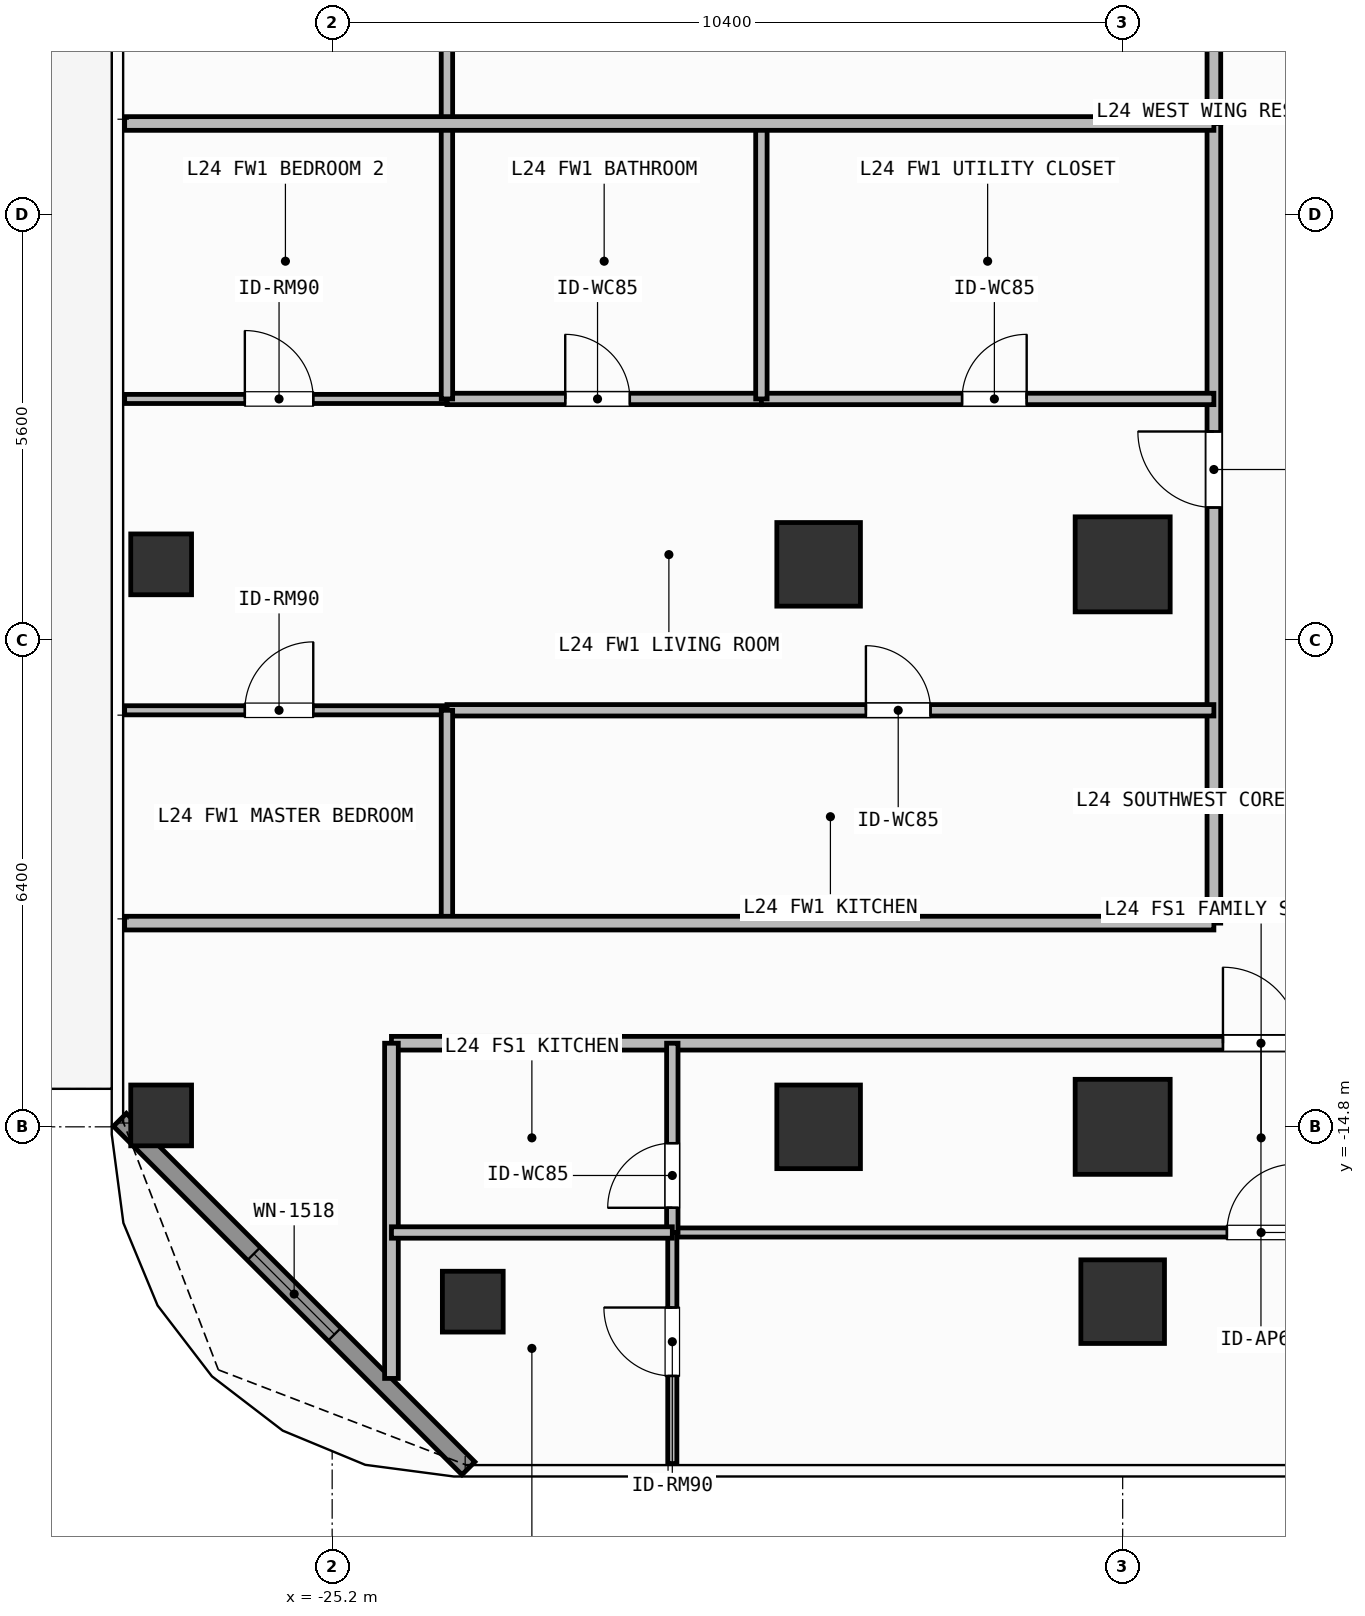
"""IFC4 building model, lengths in metres.
Left out: names, types, materials, properties, quantities, classifications, styles, units other than length and angle.
Written with IfcOpenShell. Run it as: python <this file> out.ifc"""

import sys

from ifc_helpers import new_model, si_unit, direction, frame, frame_2d, origin, origin_2d, place, context, subcontext, project, spatial, rectangle, hollow_rectangle, extrude, element, fill, save


model = new_model("IFC4")
c1 = context("Model", 3, precision=1e-05, world=origin(), true_north=direction((0.0, 1.0)))
c2 = subcontext(c1, "Body", "Model", "MODEL_VIEW")
j1 = project(units=[si_unit("LENGTHUNIT", "METRE"), si_unit("PLANEANGLEUNIT", "RADIAN")], contexts=[c1])
p1 = place(None, origin())
s1 = spatial("IfcSite", under=j1, at=p1, CompositionType="ELEMENT")
p2 = place(p1, origin())
s2 = spatial("IfcBuilding", under=s1, at=p2, CompositionType="ELEMENT")
p3 = place(p2, frame((0.0, 0.0, 96.9)))
s3 = spatial("IfcBuildingStorey", under=s2, at=p3, CompositionType="ELEMENT", Elevation=96.9)
for number, where, z_axis, x_axis in (
    (1, (-14.8, -14.8, 0.0), (0.0, 0.0, 1.0), (1.0, 0.0, 0.0)),
    (2, (-14.8, -7.4, 0.0), (0.0, 0.0, 1.0), (1.0, 0.0, 0.0)),
):
    element("IfcColumn", number, at=place(p3, frame(where, z_axis=z_axis, x_axis=x_axis)), inside=s3, PredefinedType="COLUMN", context=c2, shape_type="SweptSolid", body=[
        extrude(rectangle(XDim=1.25, YDim=1.25, at=origin_2d()), origin(), (0.0, 0.0, 1.0), 3.9),
    ])
for number, where, z_axis, x_axis in (
    (3, (-18.8, -14.8, 0.0), (0.0, 0.0, 1.0), (1.0, 0.0, 0.0)),
    (4, (-18.8, -7.4, 0.0), (0.0, 0.0, 1.0), (1.0, 0.0, 0.0)),
    (5, (-14.8, -17.1, 0.0), (0.0, 0.0, 1.0), (1.0, 0.0, 0.0)),
):
    element("IfcColumn", number, at=place(p3, frame(where, z_axis=z_axis, x_axis=x_axis)), inside=s3, PredefinedType="COLUMN", context=c2, shape_type="SweptSolid", body=[
        extrude(rectangle(XDim=1.1, YDim=1.1, at=origin_2d()), origin(), (0.0, 0.0, 1.0), 3.9),
    ])
for number, where, z_axis, x_axis in (
    (6, (-23.35, -17.1, 0.0), (0.0, 0.0, 1.0), (1.0, 0.0, 0.0)),
    (7, (-27.45, -14.65, 0.0), (0.0, 0.0, 1.0), (1.0, 0.0, 0.0)),
    (8, (-27.45, -7.4, 0.0), (0.0, 0.0, 1.0), (1.0, 0.0, 0.0)),
):
    element("IfcColumn", number, at=place(p3, frame(where, z_axis=z_axis, x_axis=x_axis)), inside=s3, PredefinedType="COLUMN", context=c2, shape_type="SweptSolid", body=[
        extrude(hollow_rectangle(XDim=0.8, YDim=0.8, WallThickness=0.036, at=origin_2d()), origin(), (0.0, 0.0, 1.0), 3.9),
    ])
p4 = place(p3, frame((-23.408, -19.292, 0.0), z_axis=(0.0, 0.0, 1.0), x_axis=(-0.707087954376, 0.707125607496, 0.0)))
e9 = element("IfcWall", 9, at=p4, inside=s3, PredefinedType="SOLIDWALL", context=c2, shape_type="SweptSolid", body=[
    extrude(rectangle(XDim=6.484, YDim=0.24, at=frame_2d((3.242, 0.0))), origin(), (0.0, 0.0, 1.0), 3.68),
])
p5 = place(p4, frame((2.492, 0.0, 0.8)))
e10 = element("IfcOpeningElement", 10, at=p5, cuts=e9, PredefinedType="OPENING", context=c2, shape_type="SweptSolid", body=[
    extrude(rectangle(XDim=1.5, YDim=1.85, at=frame_2d((0.75, 0.925))), frame((0.0, 0.13, 0.0), z_axis=(0.0, -1.0, 0.0), x_axis=(1.0, 0.0, 0.0)), (0.0, 0.0, 1.0), 0.26),
])
p6 = place(p3, frame((-24.42, -13.7, 0.0), z_axis=(0.0, 0.0, 1.0), x_axis=(1.0, 0.0, 0.0)))
e11 = element("IfcWall", 11, at=p6, inside=s3, PredefinedType="PARTITIONING", context=c2, shape_type="SweptSolid", body=[
    extrude(rectangle(XDim=25.394, YDim=0.18, at=frame_2d((12.697, 0.0))), origin(), (0.0, 0.0, 1.0), 3.68),
])
p7 = place(p6, frame((10.939, 0.0, 0.0)))
e12 = element("IfcOpeningElement", 12, at=p7, cuts=e11, PredefinedType="OPENING", context=c2, shape_type="SweptSolid", body=[
    extrude(rectangle(XDim=1.0, YDim=2.2, at=frame_2d((0.5, 1.1))), frame((0.0, 0.1, 0.0), z_axis=(0.0, -1.0, 0.0), x_axis=(1.0, 0.0, 0.0)), (0.0, 0.0, 1.0), 0.2),
])
p8 = place(p3, frame((-20.725, -16.19, 0.0), z_axis=(0.0, 0.0, 1.0), x_axis=(1.0, 0.0, 0.0)))
e13 = element("IfcWall", 13, at=p8, inside=s3, PredefinedType="PARTITIONING", context=c2, shape_type="SweptSolid", body=[
    extrude(rectangle(XDim=15.493, YDim=0.12, at=frame_2d((7.747, 0.0))), origin(), (0.0, 0.0, 1.0), 3.68),
])
p9 = place(p8, frame((7.296, 0.0, 0.0)))
e14 = element("IfcOpeningElement", 14, at=p9, cuts=e13, PredefinedType="OPENING", context=c2, shape_type="SweptSolid", body=[
    extrude(rectangle(XDim=0.9, YDim=2.1, at=frame_2d((0.45, 1.05))), frame((0.0, 0.07, 0.0), z_axis=(0.0, -1.0, 0.0), x_axis=(1.0, 0.0, 0.0)), (0.0, 0.0, 1.0), 0.14),
])
p10 = place(p3, frame((-20.725, -16.19, 0.0), z_axis=(0.0, 0.0, 1.0), x_axis=(0.0, 1.0, 0.0)))
e15 = element("IfcWall", 15, at=p10, inside=s3, PredefinedType="PARTITIONING", context=c2, shape_type="SweptSolid", body=[
    extrude(rectangle(XDim=2.49, YDim=0.15, at=frame_2d((1.245, 0.0))), origin(), (0.0, 0.0, 1.0), 3.68),
])
p11 = place(p10, frame((0.325, 0.0, 0.0)))
e16 = element("IfcOpeningElement", 16, at=p11, cuts=e15, PredefinedType="OPENING", context=c2, shape_type="SweptSolid", body=[
    extrude(rectangle(XDim=0.85, YDim=2.1, at=frame_2d((0.425, 1.05))), frame((0.0, 0.085, 0.0), z_axis=(0.0, -1.0, 0.0), x_axis=(1.0, 0.0, 0.0)), (0.0, 0.0, 1.0), 0.17),
])
p12 = place(p3, frame((-20.725, -19.23, 0.0), z_axis=(0.0, 0.0, 1.0), x_axis=(0.0, 1.0, 0.0)))
e17 = element("IfcWall", 17, at=p12, inside=s3, PredefinedType="PARTITIONING", context=c2, shape_type="SweptSolid", body=[
    extrude(rectangle(XDim=3.04, YDim=0.12, at=frame_2d((1.52, 0.0))), origin(), (0.0, 0.0, 1.0), 3.68),
])
p13 = place(p12, frame((1.153, 0.0, 0.0)))
e18 = element("IfcOpeningElement", 18, at=p13, cuts=e17, PredefinedType="OPENING", context=c2, shape_type="SweptSolid", body=[
    extrude(rectangle(XDim=0.9, YDim=2.1, at=frame_2d((0.45, 1.05))), frame((0.0, 0.07, 0.0), z_axis=(0.0, -1.0, 0.0), x_axis=(1.0, 0.0, 0.0)), (0.0, 0.0, 1.0), 0.14),
])
p14 = place(p3, frame((-13.6, -12.12, 0.0), z_axis=(0.0, 0.0, 1.0), x_axis=(0.0, 1.0, 0.0)))
e19 = element("IfcWall", 19, at=p14, inside=s3, PredefinedType="PARTITIONING", context=c2, shape_type="SweptSolid", body=[
    extrude(rectangle(XDim=10.52, YDim=0.18, at=frame_2d((5.26, 0.0))), origin(), (0.0, 0.0, 1.0), 3.68),
])
p15 = place(p14, frame((5.468, 0.0, 0.0)))
e20 = element("IfcOpeningElement", 20, at=p15, cuts=e19, PredefinedType="OPENING", context=c2, shape_type="SweptSolid", body=[
    extrude(rectangle(XDim=1.0, YDim=2.2, at=frame_2d((0.5, 1.1))), frame((0.0, 0.1, 0.0), z_axis=(0.0, -1.0, 0.0), x_axis=(1.0, 0.0, 0.0)), (0.0, 0.0, 1.0), 0.2),
])
p16 = place(p3, frame((-23.69, -5.224, 0.0), z_axis=(0.0, 0.0, 1.0), x_axis=(1.0, 0.0, 0.0)))
e21 = element("IfcWall", 21, at=p16, inside=s3, PredefinedType="PARTITIONING", context=c2, shape_type="SweptSolid", body=[
    extrude(rectangle(XDim=4.137, YDim=0.15, at=frame_2d((2.068, 0.0))), origin(), (0.0, 0.0, 1.0), 3.68),
])
p17 = place(p16, frame((1.556, 0.0, 0.0)))
e22 = element("IfcOpeningElement", 22, at=p17, cuts=e21, PredefinedType="OPENING", context=c2, shape_type="SweptSolid", body=[
    extrude(rectangle(XDim=0.85, YDim=2.1, at=frame_2d((0.425, 1.05))), frame((0.0, 0.085, 0.0), z_axis=(0.0, -1.0, 0.0), x_axis=(1.0, 0.0, 0.0)), (0.0, 0.0, 1.0), 0.17),
])
p18 = place(p3, frame((-19.553, -5.224, 0.0), z_axis=(0.0, 0.0, 1.0), x_axis=(1.0, 0.0, 0.0)))
e23 = element("IfcWall", 23, at=p18, inside=s3, PredefinedType="PARTITIONING", context=c2, shape_type="SweptSolid", body=[
    extrude(rectangle(XDim=5.953, YDim=0.15, at=frame_2d((2.977, 0.0))), origin(), (0.0, 0.0, 1.0), 3.68),
])
p19 = place(p18, frame((2.64, 0.0, 0.0)))
e24 = element("IfcOpeningElement", 24, at=p19, cuts=e23, PredefinedType="OPENING", context=c2, shape_type="SweptSolid", body=[
    extrude(rectangle(XDim=0.85, YDim=2.1, at=frame_2d((0.425, 1.05))), frame((0.0, 0.085, 0.0), z_axis=(0.0, -1.0, 0.0), x_axis=(1.0, 0.0, 0.0)), (0.0, 0.0, 1.0), 0.17),
])
p20 = place(p3, frame((-23.69, -9.32, 0.0), z_axis=(0.0, 0.0, 1.0), x_axis=(1.0, 0.0, 0.0)))
e25 = element("IfcWall", 25, at=p20, inside=s3, PredefinedType="PARTITIONING", context=c2, shape_type="SweptSolid", body=[
    extrude(rectangle(XDim=10.09, YDim=0.15, at=frame_2d((5.045, 0.0))), origin(), (0.0, 0.0, 1.0), 3.68),
])
p21 = place(p20, frame((5.512, 0.0, 0.0)))
e26 = element("IfcOpeningElement", 26, at=p21, cuts=e25, PredefinedType="OPENING", context=c2, shape_type="SweptSolid", body=[
    extrude(rectangle(XDim=0.85, YDim=2.1, at=frame_2d((0.425, 1.05))), frame((0.0, 0.085, 0.0), z_axis=(0.0, -1.0, 0.0), x_axis=(1.0, 0.0, 0.0)), (0.0, 0.0, 1.0), 0.17),
])
p22 = place(p3, frame((-27.93, -9.32, 0.0), z_axis=(0.0, 0.0, 1.0), x_axis=(1.0, 0.0, 0.0)))
e27 = element("IfcWall", 27, at=p22, inside=s3, PredefinedType="PARTITIONING", context=c2, shape_type="SweptSolid", body=[
    extrude(rectangle(XDim=4.24, YDim=0.12, at=frame_2d((2.12, 0.0))), origin(), (0.0, 0.0, 1.0), 3.68),
])
p23 = place(p22, frame((1.581, 0.0, 0.0)))
e28 = element("IfcOpeningElement", 28, at=p23, cuts=e27, PredefinedType="OPENING", context=c2, shape_type="SweptSolid", body=[
    extrude(rectangle(XDim=0.9, YDim=2.1, at=frame_2d((0.45, 1.05))), frame((0.0, 0.07, 0.0), z_axis=(0.0, -1.0, 0.0), x_axis=(1.0, 0.0, 0.0)), (0.0, 0.0, 1.0), 0.14),
])
p24 = place(p3, frame((-27.93, -5.224, 0.0), z_axis=(0.0, 0.0, 1.0), x_axis=(1.0, 0.0, 0.0)))
e29 = element("IfcWall", 29, at=p24, inside=s3, PredefinedType="PARTITIONING", context=c2, shape_type="SweptSolid", body=[
    extrude(rectangle(XDim=4.24, YDim=0.12, at=frame_2d((2.12, 0.0))), origin(), (0.0, 0.0, 1.0), 3.68),
])
p25 = place(p24, frame((1.581, 0.0, 0.0)))
e30 = element("IfcOpeningElement", 30, at=p25, cuts=e29, PredefinedType="OPENING", context=c2, shape_type="SweptSolid", body=[
    extrude(rectangle(XDim=0.9, YDim=2.1, at=frame_2d((0.45, 1.05))), frame((0.0, 0.07, 0.0), z_axis=(0.0, -1.0, 0.0), x_axis=(1.0, 0.0, 0.0)), (0.0, 0.0, 1.0), 0.14),
])
p26 = place(p3, frame((-13.6, -1.6, 0.0), z_axis=(0.0, 0.0, 1.0), x_axis=(0.0, 1.0, 0.0)))
e31 = element("IfcWall", 31, at=p26, inside=s3, PredefinedType="PARTITIONING", context=c2, shape_type="SweptSolid", body=[
    extrude(rectangle(XDim=13.72, YDim=0.18, at=frame_2d((6.86, 0.0))), origin(), (0.0, 0.0, 1.0), 3.68),
])
p27 = place(p26, frame((6.989, 0.0, 0.0)))
e32 = element("IfcOpeningElement", 32, at=p27, cuts=e31, PredefinedType="OPENING", context=c2, shape_type="SweptSolid", body=[
    extrude(rectangle(XDim=1.0, YDim=2.2, at=frame_2d((0.5, 1.1))), frame((0.0, 0.1, 0.0), z_axis=(0.0, -1.0, 0.0), x_axis=(1.0, 0.0, 0.0)), (0.0, 0.0, 1.0), 0.2),
])
p28 = place(p3, frame((-24.42, -18.11, 0.0), z_axis=(0.0, 0.0, 1.0), x_axis=(0.0, 1.0, 0.0)))
e33 = element("IfcWall", 33, at=p28, inside=s3, PredefinedType="PARTITIONING", context=c2, shape_type="SweptSolid", body=[
    extrude(rectangle(XDim=4.41, YDim=0.18, at=frame_2d((2.205, 0.0))), origin(), (0.0, 0.0, 1.0), 3.68),
])
p29 = place(p3, frame((-24.42, -16.19, 0.0), z_axis=(0.0, 0.0, 1.0), x_axis=(1.0, 0.0, 0.0)))
e34 = element("IfcWall", 34, at=p29, inside=s3, PredefinedType="PARTITIONING", context=c2, shape_type="SweptSolid", body=[
    extrude(rectangle(XDim=3.695, YDim=0.15, at=frame_2d((1.847, 0.0))), origin(), (0.0, 0.0, 1.0), 3.68),
])
p30 = place(p3, frame((-19.553, -5.224, 0.0), z_axis=(0.0, 0.0, 1.0), x_axis=(0.0, 1.0, 0.0)))
e35 = element("IfcWall", 35, at=p30, inside=s3, PredefinedType="PARTITIONING", context=c2, shape_type="SweptSolid", body=[
    extrude(rectangle(XDim=3.624, YDim=0.15, at=frame_2d((1.812, 0.0))), origin(), (0.0, 0.0, 1.0), 3.68),
])
p31 = place(p3, frame((-23.69, -12.12, 0.0), z_axis=(0.0, 0.0, 1.0), x_axis=(0.0, 1.0, 0.0)))
e36 = element("IfcWall", 36, at=p31, inside=s3, PredefinedType="PARTITIONING", context=c2, shape_type="SweptSolid", body=[
    extrude(rectangle(XDim=2.8, YDim=0.15, at=frame_2d((1.4, 0.0))), origin(), (0.0, 0.0, 1.0), 3.68),
])
p32 = place(p3, frame((-23.69, -5.224, 0.0), z_axis=(0.0, 0.0, 1.0), x_axis=(0.0, 1.0, 0.0)))
e37 = element("IfcWall", 37, at=p32, inside=s3, PredefinedType="PARTITIONING", context=c2, shape_type="SweptSolid", body=[
    extrude(rectangle(XDim=3.624, YDim=0.15, at=frame_2d((1.812, 0.0))), origin(), (0.0, 0.0, 1.0), 3.68),
])
p33 = place(p3, frame((-23.69, -1.6, 0.0), z_axis=(0.0, 0.0, 1.0), x_axis=(0.0, 1.0, 0.0)))
e38 = element("IfcWall", 38, at=p33, inside=s3, PredefinedType="PARTITIONING", context=c2, shape_type="SweptSolid", body=[
    extrude(rectangle(XDim=4.191, YDim=0.15, at=frame_2d((2.096, 0.0))), origin(), (0.0, 0.0, 1.0), 3.68),
])
for number, where, z_axis, x_axis in (
    (39, (-27.93, -1.6, 0.0), (0.0, 0.0, 1.0), (1.0, 0.0, 0.0)),
    (40, (-27.93, -12.12, 0.0), (0.0, 0.0, 1.0), (1.0, 0.0, 0.0)),
):
    element("IfcWall", number, at=place(p3, frame(where, z_axis=z_axis, x_axis=x_axis)), inside=s3, PredefinedType="PARTITIONING", context=c2, shape_type="SweptSolid", body=[
        extrude(rectangle(XDim=14.33, YDim=0.18, at=frame_2d((7.165, 0.0))), origin(), (0.0, 0.0, 1.0), 3.68),
    ])
p34 = place(p5, origin())
e41 = element("IfcWindow", 41, at=p34, inside=s3, PartitioningType="SINGLE_PANEL", PredefinedType="WINDOW", context=c2, shape_type="SweptSolid", body=[
    extrude(rectangle(XDim=1.5, YDim=1.85, at=frame_2d((0.75, 0.925))), frame((0.0, 0.03, 0.0), z_axis=(0.0, -1.0, 0.0), x_axis=(1.0, 0.0, 0.0)), (0.0, 0.0, 1.0), 0.06),
])
fill(e10, e41)
p35 = place(p7, origin())
e42 = element("IfcDoor", 42, at=p35, inside=s3, OperationType="SINGLE_SWING_LEFT", PredefinedType="DOOR", context=c2, shape_type="SweptSolid", body=[
    extrude(rectangle(XDim=1.0, YDim=2.2, at=frame_2d((0.5, 1.1))), frame((0.0, 0.025, 0.0), z_axis=(0.0, -1.0, 0.0), x_axis=(1.0, 0.0, 0.0)), (0.0, 0.0, 1.0), 0.05),
])
fill(e12, e42)
p36 = place(p9, origin())
e43 = element("IfcDoor", 43, at=p36, inside=s3, OperationType="SINGLE_SWING_RIGHT", PredefinedType="DOOR", context=c2, shape_type="SweptSolid", body=[
    extrude(rectangle(XDim=0.9, YDim=2.1, at=frame_2d((0.45, 1.05))), frame((0.0, 0.025, 0.0), z_axis=(0.0, -1.0, 0.0), x_axis=(1.0, 0.0, 0.0)), (0.0, 0.0, 1.0), 0.05),
])
fill(e14, e43)
p37 = place(p11, origin())
e44 = element("IfcDoor", 44, at=p37, inside=s3, OperationType="SINGLE_SWING_LEFT", PredefinedType="DOOR", context=c2, shape_type="SweptSolid", body=[
    extrude(rectangle(XDim=0.85, YDim=2.1, at=frame_2d((0.425, 1.05))), frame((0.0, 0.025, 0.0), z_axis=(0.0, -1.0, 0.0), x_axis=(1.0, 0.0, 0.0)), (0.0, 0.0, 1.0), 0.05),
])
fill(e16, e44)
p38 = place(p13, origin())
e45 = element("IfcDoor", 45, at=p38, inside=s3, OperationType="SINGLE_SWING_RIGHT", PredefinedType="DOOR", context=c2, shape_type="SweptSolid", body=[
    extrude(rectangle(XDim=0.9, YDim=2.1, at=frame_2d((0.45, 1.05))), frame((0.0, 0.025, 0.0), z_axis=(0.0, -1.0, 0.0), x_axis=(1.0, 0.0, 0.0)), (0.0, 0.0, 1.0), 0.05),
])
fill(e18, e45)
p39 = place(p15, origin())
e46 = element("IfcDoor", 46, at=p39, inside=s3, OperationType="SINGLE_SWING_RIGHT", PredefinedType="DOOR", context=c2, shape_type="SweptSolid", body=[
    extrude(rectangle(XDim=1.0, YDim=2.2, at=frame_2d((0.5, 1.1))), frame((0.0, 0.025, 0.0), z_axis=(0.0, -1.0, 0.0), x_axis=(1.0, 0.0, 0.0)), (0.0, 0.0, 1.0), 0.05),
])
fill(e20, e46)
p40 = place(p17, origin())
e47 = element("IfcDoor", 47, at=p40, inside=s3, OperationType="SINGLE_SWING_LEFT", PredefinedType="DOOR", context=c2, shape_type="SweptSolid", body=[
    extrude(rectangle(XDim=0.85, YDim=2.1, at=frame_2d((0.425, 1.05))), frame((0.0, 0.025, 0.0), z_axis=(0.0, -1.0, 0.0), x_axis=(1.0, 0.0, 0.0)), (0.0, 0.0, 1.0), 0.05),
])
fill(e22, e47)
p41 = place(p19, origin())
e48 = element("IfcDoor", 48, at=p41, inside=s3, OperationType="SINGLE_SWING_RIGHT", PredefinedType="DOOR", context=c2, shape_type="SweptSolid", body=[
    extrude(rectangle(XDim=0.85, YDim=2.1, at=frame_2d((0.425, 1.05))), frame((0.0, 0.025, 0.0), z_axis=(0.0, -1.0, 0.0), x_axis=(1.0, 0.0, 0.0)), (0.0, 0.0, 1.0), 0.05),
])
fill(e24, e48)
p42 = place(p21, origin())
e49 = element("IfcDoor", 49, at=p42, inside=s3, OperationType="SINGLE_SWING_LEFT", PredefinedType="DOOR", context=c2, shape_type="SweptSolid", body=[
    extrude(rectangle(XDim=0.85, YDim=2.1, at=frame_2d((0.425, 1.05))), frame((0.0, 0.025, 0.0), z_axis=(0.0, -1.0, 0.0), x_axis=(1.0, 0.0, 0.0)), (0.0, 0.0, 1.0), 0.05),
])
fill(e26, e49)
p43 = place(p23, origin())
e50 = element("IfcDoor", 50, at=p43, inside=s3, OperationType="SINGLE_SWING_RIGHT", PredefinedType="DOOR", context=c2, shape_type="SweptSolid", body=[
    extrude(rectangle(XDim=0.9, YDim=2.1, at=frame_2d((0.45, 1.05))), frame((0.0, 0.025, 0.0), z_axis=(0.0, -1.0, 0.0), x_axis=(1.0, 0.0, 0.0)), (0.0, 0.0, 1.0), 0.05),
])
fill(e28, e50)
p44 = place(p25, origin())
e51 = element("IfcDoor", 51, at=p44, inside=s3, OperationType="SINGLE_SWING_LEFT", PredefinedType="DOOR", context=c2, shape_type="SweptSolid", body=[
    extrude(rectangle(XDim=0.9, YDim=2.1, at=frame_2d((0.45, 1.05))), frame((0.0, 0.025, 0.0), z_axis=(0.0, -1.0, 0.0), x_axis=(1.0, 0.0, 0.0)), (0.0, 0.0, 1.0), 0.05),
])
fill(e30, e51)
save(model, sys.argv[1])
